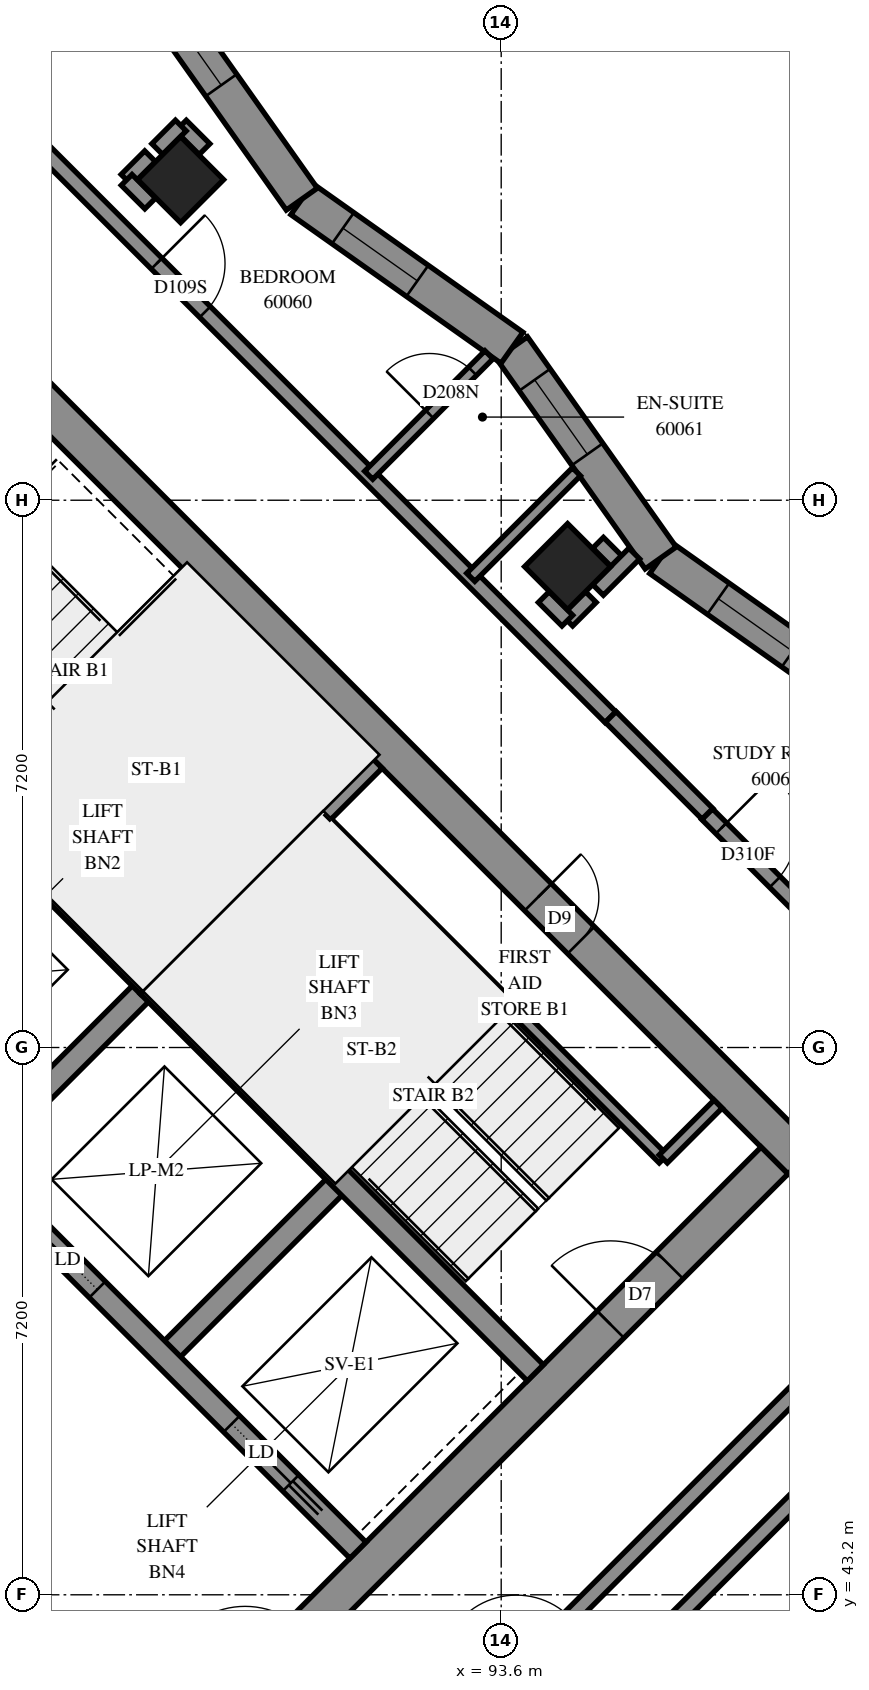
"""IFC4 building model, lengths in metres.
Left out: names, types, materials, properties, quantities, classifications, styles, units other than length and angle.
Written with IfcOpenShell. Run it as: python <this file> out.ifc"""

import sys

from ifc_helpers import new_model, si_unit, direction, frame, frame_2d, origin, origin_2d, place, context, subcontext, project, spatial, polyline, rectangle, outline, extrude, element, fill, save


model = new_model("IFC4")
c1 = context("Model", 3, precision=1e-05, world=origin(), true_north=direction((0.0, 1.0)))
c2 = subcontext(c1, "Body", "Model", "MODEL_VIEW")
j1 = project(units=[si_unit("LENGTHUNIT", "METRE"), si_unit("PLANEANGLEUNIT", "RADIAN")], contexts=[c1])
p1 = place(None, origin())
s1 = spatial("IfcSite", under=j1, at=p1, CompositionType="ELEMENT")
p2 = place(p1, origin())
s2 = spatial("IfcBuilding", under=s1, at=p2, CompositionType="ELEMENT")
p3 = place(p2, frame((0.0, 0.0, 220.2)))
s3 = spatial("IfcBuildingStorey", under=s2, at=p3, CompositionType="ELEMENT", Elevation=220.2)
for number, where, z_axis, x_axis in (
    (1, (89.382, 61.818, 0.0), (0.0, 0.0, 1.0), (0.707, -0.707, 0.0)),
    (2, (94.474, 56.727, 0.0), (0.0, 0.0, 1.0), (0.707, -0.707, 0.0)),
):
    element("IfcColumn", number, at=place(p3, frame(where, z_axis=z_axis, x_axis=x_axis)), inside=s3, PredefinedType="COLUMN", context=c2, shape_type="SweptSolid", body=[
        extrude(rectangle(XDim=0.8, YDim=0.8, at=origin_2d()), origin(), (0.0, 0.0, 1.0), 3.1),
    ])
p4 = place(p3, frame((86.66, 59.802, -0.3), z_axis=(0.0, 0.0, 1.0), x_axis=(0.7071067812, -0.7071067812, 0.0)))
e3 = element("IfcWall", 3, at=p4, inside=s3, PredefinedType="SHEAR", context=c2, shape_type="SweptSolid", body=[
    extrude(rectangle(XDim=15.4, YDim=0.5, at=frame_2d((7.7, 0.0))), origin(), (0.0, 0.0, 1.0), 2.7),
])
p5 = place(p4, frame((10.5, 0.0, 0.3)))
e4 = element("IfcOpeningElement", 4, at=p5, cuts=e3, PredefinedType="OPENING", context=c2, shape_type="SweptSolid", body=[
    extrude(rectangle(XDim=0.8, YDim=2.1, at=frame_2d((0.4, 1.05))), frame((0.0, 0.26, 0.0), z_axis=(0.0, -1.0, 0.0), x_axis=(1.0, 0.0, 0.0)), (0.0, 0.0, 1.0), 0.52),
])
p6 = place(p3, frame((87.013, 38.731, -0.3), z_axis=(0.0, 0.0, 1.0), x_axis=(0.7071067812, 0.7071067812, 0.0)))
e5 = element("IfcWall", 5, at=p6, inside=s3, PredefinedType="SHEAR", context=c2, shape_type="SweptSolid", body=[
    extrude(rectangle(XDim=14.4, YDim=0.5, at=frame_2d((7.2, 0.0))), origin(), (0.0, 0.0, 1.0), 2.7),
])
p7 = place(p6, frame((4.55, 0.0, 0.3)))
e6 = element("IfcOpeningElement", 6, at=p7, cuts=e5, PredefinedType="OPENING", context=c2, shape_type="SweptSolid", body=[
    extrude(rectangle(XDim=1.1, YDim=2.1, at=frame_2d((0.55, 1.05))), frame((0.0, 0.26, 0.0), z_axis=(0.0, -1.0, 0.0), x_axis=(1.0, 0.0, 0.0)), (0.0, 0.0, 1.0), 0.52),
])
p8 = place(p6, frame((11.35, 0.0, 0.3)))
e7 = element("IfcOpeningElement", 7, at=p8, cuts=e5, PredefinedType="OPENING", context=c2, shape_type="SweptSolid", body=[
    extrude(rectangle(XDim=1.1, YDim=2.1, at=frame_2d((0.55, 1.05))), frame((0.0, 0.26, 0.0), z_axis=(0.0, -1.0, 0.0), x_axis=(1.0, 0.0, 0.0)), (0.0, 0.0, 1.0), 0.52),
])
for number, where, z_axis, x_axis in (
    (8, (86.625, 48.878, 0.0), (0.0, 0.0, 1.0), (0.707, 0.707, 0.0)),
    (9, (89.17, 46.332, 0.0), (0.0, 0.0, 1.0), (0.707, 0.707, 0.0)),
):
    element("IfcWall", number, at=place(p3, frame(where, z_axis=z_axis, x_axis=x_axis)), inside=s3, PredefinedType="SOLIDWALL", context=c2, shape_type="SweptSolid", body=[
        extrude(rectangle(XDim=3.3, YDim=0.3, at=frame_2d((1.65, 0.0))), origin(), (0.0, 0.0, 1.0), 3.1),
    ])
p9 = place(p3, frame((78.988, 51.423, 0.0), z_axis=(0.0, 0.0, 1.0), x_axis=(0.7071067812, -0.7071067812, 0.0)))
e10 = element("IfcWall", 10, at=p9, inside=s3, PredefinedType="SOLIDWALL", context=c2, shape_type="SweptSolid", body=[
    extrude(rectangle(XDim=14.4, YDim=0.3, at=frame_2d((7.2, 0.0))), origin(), (0.0, 0.0, 1.0), 3.1),
])
p10 = place(p9, frame((1.35, 0.0, 0.0)))
e11 = element("IfcOpeningElement", 11, at=p10, cuts=e10, PredefinedType="OPENING", context=c2, shape_type="SweptSolid", body=[
    extrude(rectangle(XDim=0.9, YDim=2.1, at=frame_2d((0.45, 1.05))), frame((0.0, 0.16, 0.0), z_axis=(0.0, -1.0, 0.0), x_axis=(1.0, 0.0, 0.0)), (0.0, 0.0, 1.0), 0.32),
])
p11 = place(p9, frame((4.95, 0.0, 0.0)))
e12 = element("IfcOpeningElement", 12, at=p11, cuts=e10, PredefinedType="OPENING", context=c2, shape_type="SweptSolid", body=[
    extrude(rectangle(XDim=0.9, YDim=2.1, at=frame_2d((0.45, 1.05))), frame((0.0, 0.16, 0.0), z_axis=(0.0, -1.0, 0.0), x_axis=(1.0, 0.0, 0.0)), (0.0, 0.0, 1.0), 0.32),
])
p12 = place(p9, frame((8.55, 0.0, 0.0)))
e13 = element("IfcOpeningElement", 13, at=p12, cuts=e10, PredefinedType="OPENING", context=c2, shape_type="SweptSolid", body=[
    extrude(rectangle(XDim=0.9, YDim=2.1, at=frame_2d((0.45, 1.05))), frame((0.0, 0.16, 0.0), z_axis=(0.0, -1.0, 0.0), x_axis=(1.0, 0.0, 0.0)), (0.0, 0.0, 1.0), 0.32),
])
p13 = place(p9, frame((12.05, 0.0, 0.0)))
e14 = element("IfcOpeningElement", 14, at=p13, cuts=e10, PredefinedType="OPENING", context=c2, shape_type="SweptSolid", body=[
    extrude(rectangle(XDim=1.1, YDim=2.1, at=frame_2d((0.55, 1.05))), frame((0.0, 0.16, 0.0), z_axis=(0.0, -1.0, 0.0), x_axis=(1.0, 0.0, 0.0)), (0.0, 0.0, 1.0), 0.32),
])
p14 = place(p3, frame((81.534, 53.969, 0.0), z_axis=(0.0, 0.0, 1.0), x_axis=(0.707103309, -0.7071102534, 0.0)))
e15 = element("IfcWall", 15, at=p14, inside=s3, PredefinedType="SOLIDWALL", context=c2, shape_type="SweptSolid", body=[
    extrude(rectangle(XDim=14.4, YDim=0.3, at=frame_2d((7.2, 0.0))), origin(), (0.0, 0.0, 1.0), 3.1),
])
p15 = place(p14, frame((1.25, 0.0, 0.0)))
e16 = element("IfcOpeningElement", 16, at=p15, cuts=e15, PredefinedType="OPENING", context=c2, shape_type="SweptSolid", body=[
    extrude(rectangle(XDim=1.1, YDim=2.1, at=frame_2d((0.55, 1.05))), frame((0.0, 0.16, 0.0), z_axis=(0.0, -1.0, 0.0), x_axis=(1.0, 0.0, 0.0)), (0.0, 0.0, 1.0), 0.32),
])
p16 = place(p14, frame((4.85, 0.0, 0.0)))
e17 = element("IfcOpeningElement", 17, at=p16, cuts=e15, PredefinedType="OPENING", context=c2, shape_type="SweptSolid", body=[
    extrude(rectangle(XDim=1.1, YDim=2.1, at=frame_2d((0.55, 1.05))), frame((0.0, 0.16, 0.0), z_axis=(0.0, -1.0, 0.0), x_axis=(1.0, 0.0, 0.0)), (0.0, 0.0, 1.0), 0.32),
])
p17 = place(p14, frame((8.45, 0.0, 0.0)))
e18 = element("IfcOpeningElement", 18, at=p17, cuts=e15, PredefinedType="OPENING", context=c2, shape_type="SweptSolid", body=[
    extrude(rectangle(XDim=1.1, YDim=2.1, at=frame_2d((0.55, 1.05))), frame((0.0, 0.16, 0.0), z_axis=(0.0, -1.0, 0.0), x_axis=(1.0, 0.0, 0.0)), (0.0, 0.0, 1.0), 0.32),
])
p18 = place(p14, frame((12.05, 0.0, 0.0)))
e19 = element("IfcOpeningElement", 19, at=p18, cuts=e15, PredefinedType="OPENING", context=c2, shape_type="SweptSolid", body=[
    extrude(rectangle(XDim=1.1, YDim=2.1, at=frame_2d((0.55, 1.05))), frame((0.0, 0.16, 0.0), z_axis=(0.0, -1.0, 0.0), x_axis=(1.0, 0.0, 0.0)), (0.0, 0.0, 1.0), 0.32),
])
for number, where, z_axis, x_axis in (
    (20, (83.867, 56.302, 0.0), (0.0, 0.0, 1.0), (0.707, -0.707, 0.0)),
    (21, (88.958, 51.211, 0.0), (0.0, 0.0, 1.0), (0.707, -0.707, 0.0)),
):
    element("IfcWall", number, at=place(p3, frame(where, z_axis=z_axis, x_axis=x_axis)), inside=s3, PredefinedType="SOLIDWALL", context=c2, shape_type="SweptSolid", body=[
        extrude(rectangle(XDim=7.2, YDim=0.3, at=frame_2d((3.6, 0.0))), origin(), (0.0, 0.0, 1.0), 3.1),
    ])
p19 = place(p3, frame((88.958, 51.211, 0.0), z_axis=(0.0, 0.0, 1.0), x_axis=(0.7071067812, 0.7071067812, 0.0)))
e22 = element("IfcWall", 22, at=p19, inside=s3, PredefinedType="SOLIDWALL", context=c2, shape_type="SweptSolid", body=[
    extrude(rectangle(XDim=4.2, YDim=0.3, at=frame_2d((2.1, 0.0))), origin(), (0.0, 0.0, 1.0), 3.1),
])
p20 = place(p3, frame((98.463, 54.884, 0.0), z_axis=(0.0, 0.0, 1.0), x_axis=(-0.8163684441, 0.5775314394, 0.0)))
e23 = element("IfcWall", 23, at=p20, inside=s3, PredefinedType="SOLIDWALL", context=c2, shape_type="SweptSolid", body=[
    extrude(outline(polyline([(-0.043, -0.25), (3.344, -0.25), (3.43, 0.25), (0.043, 0.25), (-0.043, -0.25)])), origin(), (0.0, 0.0, 1.0), 3.1),
])
p21 = place(p20, frame((1.259, 0.0, 0.45)))
e24 = element("IfcOpeningElement", 24, at=p21, cuts=e23, PredefinedType="OPENING", context=c2, shape_type="SweptSolid", body=[
    extrude(rectangle(XDim=1.2, YDim=2.5, at=frame_2d((0.6, 1.25))), frame((0.0, 0.26, 0.0), z_axis=(0.0, -1.0, 0.0), x_axis=(1.0, 0.0, 0.0)), (0.0, 0.0, 1.0), 0.52),
])
p22 = place(p3, frame((95.698, 56.84, 0.0), z_axis=(0.0, 0.0, 1.0), x_axis=(-0.5775371961, 0.8163643715, 0.0)))
e25 = element("IfcWall", 25, at=p22, inside=s3, PredefinedType="SOLIDWALL", context=c2, shape_type="SweptSolid", body=[
    extrude(outline(polyline([(0.043, -0.25), (3.43, -0.25), (3.344, 0.25), (-0.043, 0.25), (0.043, -0.25)])), origin(), (0.0, 0.0, 1.0), 3.1),
])
p23 = place(p22, frame((1.67, 0.0, 0.45)))
e26 = element("IfcOpeningElement", 26, at=p23, cuts=e25, PredefinedType="OPENING", context=c2, shape_type="SweptSolid", body=[
    extrude(rectangle(XDim=1.2, YDim=2.5, at=frame_2d((0.6, 1.25))), frame((0.0, 0.26, 0.0), z_axis=(0.0, -1.0, 0.0), x_axis=(1.0, 0.0, 0.0)), (0.0, 0.0, 1.0), 0.52),
])
p24 = place(p3, frame((93.742, 59.605, 0.0), z_axis=(0.0, 0.0, 1.0), x_axis=(-0.8163684441, 0.5775314394, 0.0)))
e27 = element("IfcWall", 27, at=p24, inside=s3, PredefinedType="SOLIDWALL", context=c2, shape_type="SweptSolid", body=[
    extrude(outline(polyline([(-0.043, -0.25), (3.344, -0.25), (3.43, 0.25), (0.043, 0.25), (-0.043, -0.25)])), origin(), (0.0, 0.0, 1.0), 3.1),
])
p25 = place(p24, frame((1.525, 0.0, 0.45)))
e28 = element("IfcOpeningElement", 28, at=p25, cuts=e27, PredefinedType="OPENING", context=c2, shape_type="SweptSolid", body=[
    extrude(rectangle(XDim=1.2, YDim=2.5, at=frame_2d((0.6, 1.25))), frame((0.0, 0.26, 0.0), z_axis=(0.0, -1.0, 0.0), x_axis=(1.0, 0.0, 0.0)), (0.0, 0.0, 1.0), 0.52),
])
p26 = place(p3, frame((90.977, 61.561, 0.0), z_axis=(0.0, 0.0, 1.0), x_axis=(-0.5775371961, 0.8163643715, 0.0)))
e29 = element("IfcWall", 29, at=p26, inside=s3, PredefinedType="SOLIDWALL", context=c2, shape_type="SweptSolid", body=[
    extrude(outline(polyline([(0.043, -0.25), (3.43, -0.25), (3.344, 0.25), (-0.043, 0.25), (0.043, -0.25)])), origin(), (0.0, 0.0, 1.0), 3.1),
])
p27 = place(p26, frame((1.836, 0.0, 0.45)))
e30 = element("IfcOpeningElement", 30, at=p27, cuts=e29, PredefinedType="OPENING", context=c2, shape_type="SweptSolid", body=[
    extrude(rectangle(XDim=1.2, YDim=2.5, at=frame_2d((0.6, 1.25))), frame((0.0, 0.26, 0.0), z_axis=(0.0, -1.0, 0.0), x_axis=(1.0, 0.0, 0.0)), (0.0, 0.0, 1.0), 0.52),
])
p28 = place(p3, frame((91.313, 53.354, 0.0), z_axis=(0.0, 0.0, 1.0), x_axis=(0.7071147811, -0.7070987812, 0.0)))
e31 = element("IfcWall", 31, at=p28, inside=s3, PredefinedType="PARTITIONING", context=c2, shape_type="SweptSolid", body=[
    extrude(rectangle(XDim=6.25, YDim=0.15, at=frame_2d((3.125, 0.0))), origin(), (0.0, 0.0, 1.0), 3.1),
])
p29 = place(p3, frame((95.732, 48.934, 0.0), z_axis=(0.0, 0.0, 1.0), x_axis=(0.7071067812, 0.7071067812, 0.0)))
e32 = element("IfcWall", 32, at=p29, inside=s3, PredefinedType="PARTITIONING", context=c2, shape_type="SweptSolid", body=[
    extrude(rectangle(XDim=1.02, YDim=0.15, at=frame_2d((0.51, 0.0))), origin(), (0.0, 0.0, 1.0), 3.1),
])
p30 = place(p3, frame((86.835, 62.945, 0.0), z_axis=(0.0, 0.0, 1.0), x_axis=(0.7072533434, -0.7069601886, 0.0)))
e33 = element("IfcWall", 33, at=p30, inside=s3, PredefinedType="PARTITIONING", context=c2, shape_type="SweptSolid", body=[
    extrude(rectangle(XDim=11.598, YDim=0.2, at=frame_2d((5.799, 0.0))), origin(), (0.0, 0.0, 1.0), 3.1),
])
p31 = place(p30, frame((3.156, 0.0, 0.0)))
e34 = element("IfcOpeningElement", 34, at=p31, cuts=e33, PredefinedType="OPENING", context=c2, shape_type="SweptSolid", body=[
    extrude(rectangle(XDim=0.9, YDim=2.1, at=frame_2d((0.45, 1.05))), frame((0.0, 0.11, 0.0), z_axis=(0.0, -1.0, 0.0), x_axis=(1.0, 0.0, 0.0)), (0.0, 0.0, 1.0), 0.22),
])
p32 = place(p3, frame((93.625, 42.021, 0.0), z_axis=(0.0, 0.0, 1.0), x_axis=(0.7071067812, 0.7071067812, 0.0)))
e35 = element("IfcWall", 35, at=p32, inside=s3, PredefinedType="PARTITIONING", context=c2, shape_type="SweptSolid", body=[
    extrude(rectangle(XDim=9.998, YDim=0.2, at=frame_2d((4.999, 0.0))), origin(), (0.0, 0.0, 1.0), 3.1),
])
p33 = place(p32, frame((0.248, 0.0, 0.0)))
e36 = element("IfcOpeningElement", 36, at=p33, cuts=e35, PredefinedType="OPENING", context=c2, shape_type="SweptSolid", body=[
    extrude(rectangle(XDim=1.0, YDim=2.1, at=frame_2d((0.5, 1.05))), frame((0.0, 0.11, 0.0), z_axis=(0.0, -1.0, 0.0), x_axis=(1.0, 0.0, 0.0)), (0.0, 0.0, 1.0), 0.22),
])
p34 = place(p3, frame((94.331, 41.313, 0.0), z_axis=(0.0, 0.0, 1.0), x_axis=(0.7072516979, 0.7069618347, 0.0)))
e37 = element("IfcWall", 37, at=p34, inside=s3, PredefinedType="PARTITIONING", context=c2, shape_type="SweptSolid", body=[
    extrude(rectangle(XDim=6.9, YDim=0.2, at=frame_2d((3.45, 0.0))), origin(), (0.0, 0.0, 1.0), 3.1),
])
p35 = place(p3, frame((96.309, 53.471, 0.0), z_axis=(0.0, 0.0, 1.0), x_axis=(0.7071067812, -0.7071067812, 0.0)))
e38 = element("IfcWall", 38, at=p35, inside=s3, PredefinedType="PARTITIONING", context=c2, shape_type="SweptSolid", body=[
    extrude(rectangle(XDim=6.2, YDim=0.2, at=frame_2d((3.1, 0.0))), origin(), (0.0, 0.0, 1.0), 3.1),
])
p36 = place(p35, frame((0.263, 0.0, 0.0)))
e39 = element("IfcOpeningElement", 39, at=p36, cuts=e38, PredefinedType="OPENING", context=c2, shape_type="SweptSolid", body=[
    extrude(rectangle(XDim=1.0, YDim=2.1, at=frame_2d((0.5, 1.05))), frame((0.0, 0.11, 0.0), z_axis=(0.0, -1.0, 0.0), x_axis=(1.0, 0.0, 0.0)), (0.0, 0.0, 1.0), 0.22),
])
p37 = place(p3, frame((91.857, 57.929, 0.0), z_axis=(0.0, 0.0, 1.0), x_axis=(0.7066823676, 0.7075309402, 0.0)))
e40 = element("IfcWall", 40, at=p37, inside=s3, PredefinedType="PARTITIONING", context=c2, shape_type="SweptSolid", body=[
    extrude(rectangle(XDim=2.239, YDim=0.15, at=frame_2d((1.12, 0.0))), origin(), (0.0, 0.0, 1.0), 3.1),
])
p38 = place(p37, frame((1.133, 0.0, 0.0)))
e41 = element("IfcOpeningElement", 41, at=p38, cuts=e40, PredefinedType="OPENING", context=c2, shape_type="SweptSolid", body=[
    extrude(rectangle(XDim=0.8, YDim=2.1, at=frame_2d((0.4, 1.05))), frame((0.0, 0.085, 0.0), z_axis=(0.0, -1.0, 0.0), x_axis=(1.0, 0.0, 0.0)), (0.0, 0.0, 1.0), 0.17),
])
p39 = place(p3, frame((93.2, 56.586, 0.0), z_axis=(0.0, 0.0, 1.0), x_axis=(0.7076411282, 0.7065720301, 0.0)))
e42 = element("IfcWall", 42, at=p39, inside=s3, PredefinedType="PARTITIONING", context=c2, shape_type="SweptSolid", body=[
    extrude(rectangle(XDim=1.964, YDim=0.15, at=frame_2d((0.982, 0.0))), origin(), (0.0, 0.0, 1.0), 3.1),
])
p40 = place(p3, frame((95.041, 54.749, 0.0), z_axis=(0.0, 0.0, 1.0), x_axis=(0.7065510983, -0.7076620277, 0.0)))
e43 = element("IfcWall", 43, at=p40, inside=s3, PredefinedType="PARTITIONING", context=c2, shape_type="SweptSolid", body=[
    extrude(rectangle(XDim=1.8, YDim=0.2, at=frame_2d((0.9, 0.0))), origin(), (0.0, 0.0, 1.0), 3.1),
])
for number, where, z_axis, x_axis in (
    (44, (88.671, 61.815, 0.0), (0.0, 0.0, 1.0), (0.707, 0.707, 0.0)),
    (45, (94.469, 56.017, 0.0), (0.0, 0.0, 1.0), (0.707, 0.707, 0.0)),
    (46, (88.672, 61.814, 0.0), (0.0, 0.0, 1.0), (0.707, -0.707, 0.0)),
    (47, (89.386, 62.528, 0.0), (0.0, 0.0, 1.0), (0.707, -0.707, 0.0)),
):
    element("IfcWall", number, at=place(p3, frame(where, z_axis=z_axis, x_axis=x_axis)), inside=s3, PredefinedType="PARTITIONING", context=c2, shape_type="SweptSolid", body=[
        extrude(rectangle(XDim=0.438, YDim=0.2, at=frame_2d((0.219, 0.0))), origin(), (0.0, 0.0, 1.0), 3.1),
    ])
p41 = place(p3, frame((94.874, 57.04, 0.0), z_axis=(0.0, 0.0, 1.0), x_axis=(0.7071067812, -0.7071067812, 0.0)))
e48 = element("IfcWall", 48, at=p41, inside=s3, PredefinedType="PARTITIONING", context=c2, shape_type="SweptSolid", body=[
    extrude(rectangle(XDim=0.408, YDim=0.2, at=frame_2d((0.204, 0.0))), origin(), (0.0, 0.0, 1.0), 3.1),
])
for number, where, z_axis, x_axis in (
    (49, (89.075, 62.219, 0.0), (0.0, 0.0, 1.0), (0.707, 0.707, 0.0)),
    (50, (94.16, 56.326, 0.0), (0.0, 0.0, 1.0), (0.707, -0.707, 0.0)),
):
    element("IfcWall", number, at=place(p3, frame(where, z_axis=z_axis, x_axis=x_axis)), inside=s3, PredefinedType="PARTITIONING", context=c2, shape_type="SweptSolid", body=[
        extrude(rectangle(XDim=0.438, YDim=0.2, at=frame_2d((0.219, 0.0))), origin(), (0.0, 0.0, 1.0), 3.1),
    ])
p42 = place(p3, frame((94.873, 56.421, 0.0), z_axis=(0.0, 0.0, 1.0), x_axis=(0.7071808122, 0.7070327425, 0.0)))
e51 = element("IfcWall", 51, at=p42, inside=s3, PredefinedType="PARTITIONING", context=c2, shape_type="SweptSolid", body=[
    extrude(rectangle(XDim=0.675, YDim=0.2, at=frame_2d((0.338, 0.0))), origin(), (0.0, 0.0, 1.0), 3.1),
])
p43 = place(p21, origin())
e52 = element("IfcWindow", 52, at=p43, inside=s3, PartitioningType="SINGLE_PANEL", PredefinedType="WINDOW", context=c2, shape_type="SweptSolid", body=[
    extrude(rectangle(XDim=1.2, YDim=2.5, at=frame_2d((0.6, 1.25))), frame((0.0, 0.18, 0.0), z_axis=(0.0, -1.0, 0.0), x_axis=(1.0, 0.0, 0.0)), (0.0, 0.0, 1.0), 0.06),
])
fill(e24, e52)
p44 = place(p23, origin())
e53 = element("IfcWindow", 53, at=p44, inside=s3, PartitioningType="SINGLE_PANEL", PredefinedType="WINDOW", context=c2, shape_type="SweptSolid", body=[
    extrude(rectangle(XDim=1.2, YDim=2.5, at=frame_2d((0.6, 1.25))), frame((0.0, 0.18, 0.0), z_axis=(0.0, -1.0, 0.0), x_axis=(1.0, 0.0, 0.0)), (0.0, 0.0, 1.0), 0.06),
])
fill(e26, e53)
p45 = place(p25, origin())
e54 = element("IfcWindow", 54, at=p45, inside=s3, PartitioningType="SINGLE_PANEL", PredefinedType="WINDOW", context=c2, shape_type="SweptSolid", body=[
    extrude(rectangle(XDim=1.2, YDim=2.5, at=frame_2d((0.6, 1.25))), frame((0.0, 0.18, 0.0), z_axis=(0.0, -1.0, 0.0), x_axis=(1.0, 0.0, 0.0)), (0.0, 0.0, 1.0), 0.06),
])
fill(e28, e54)
p46 = place(p27, origin())
e55 = element("IfcWindow", 55, at=p46, inside=s3, PartitioningType="SINGLE_PANEL", PredefinedType="WINDOW", context=c2, shape_type="SweptSolid", body=[
    extrude(rectangle(XDim=1.2, YDim=2.5, at=frame_2d((0.6, 1.25))), frame((0.0, 0.18, 0.0), z_axis=(0.0, -1.0, 0.0), x_axis=(1.0, 0.0, 0.0)), (0.0, 0.0, 1.0), 0.06),
])
fill(e30, e55)
p47 = place(p5, origin())
e56 = element("IfcDoor", 56, at=p47, inside=s3, OperationType="SINGLE_SWING_RIGHT", PredefinedType="DOOR", context=c2, shape_type="SweptSolid", body=[
    extrude(rectangle(XDim=0.8, YDim=2.1, at=frame_2d((0.4, 1.05))), frame((0.0, 0.025, 0.0), z_axis=(0.0, -1.0, 0.0), x_axis=(1.0, 0.0, 0.0)), (0.0, 0.0, 1.0), 0.05),
])
fill(e4, e56)
p48 = place(p8, origin())
e57 = element("IfcDoor", 57, at=p48, inside=s3, OperationType="SINGLE_SWING_RIGHT", PredefinedType="DOOR", context=c2, shape_type="SweptSolid", body=[
    extrude(rectangle(XDim=1.1, YDim=2.1, at=frame_2d((0.55, 1.05))), frame((0.0, 0.025, 0.0), z_axis=(0.0, -1.0, 0.0), x_axis=(1.0, 0.0, 0.0)), (0.0, 0.0, 1.0), 0.05),
])
fill(e7, e57)
p49 = place(p17, origin())
e58 = element("IfcDoor", 58, at=p49, inside=s3, OperationType="SLIDING_TO_LEFT", PredefinedType="DOOR", context=c2, shape_type="SweptSolid", body=[
    extrude(rectangle(XDim=1.1, YDim=2.1, at=frame_2d((0.55, 1.05))), frame((0.0, 0.025, 0.0), z_axis=(0.0, -1.0, 0.0), x_axis=(1.0, 0.0, 0.0)), (0.0, 0.0, 1.0), 0.05),
])
fill(e18, e58)
p50 = place(p18, origin())
e59 = element("IfcDoor", 59, at=p50, inside=s3, OperationType="SLIDING_TO_RIGHT", PredefinedType="DOOR", context=c2, shape_type="SweptSolid", body=[
    extrude(rectangle(XDim=1.1, YDim=2.1, at=frame_2d((0.55, 1.05))), frame((0.0, 0.025, 0.0), z_axis=(0.0, -1.0, 0.0), x_axis=(1.0, 0.0, 0.0)), (0.0, 0.0, 1.0), 0.05),
])
fill(e19, e59)
p51 = place(p31, origin())
e60 = element("IfcDoor", 60, at=p51, inside=s3, OperationType="SINGLE_SWING_LEFT", PredefinedType="DOOR", context=c2, shape_type="SweptSolid", body=[
    extrude(rectangle(XDim=0.9, YDim=2.1, at=frame_2d((0.45, 1.05))), frame((0.0, 0.025, 0.0), z_axis=(0.0, -1.0, 0.0), x_axis=(1.0, 0.0, 0.0)), (0.0, 0.0, 1.0), 0.05),
])
fill(e34, e60)
p52 = place(p38, origin())
e61 = element("IfcDoor", 61, at=p52, inside=s3, OperationType="SINGLE_SWING_RIGHT", PredefinedType="DOOR", context=c2, shape_type="SweptSolid", body=[
    extrude(rectangle(XDim=0.8, YDim=2.1, at=frame_2d((0.4, 1.05))), frame((0.0, 0.025, 0.0), z_axis=(0.0, -1.0, 0.0), x_axis=(1.0, 0.0, 0.0)), (0.0, 0.0, 1.0), 0.05),
])
fill(e41, e61)
p53 = place(p36, origin())
e62 = element("IfcDoor", 62, at=p53, inside=s3, OperationType="SINGLE_SWING_LEFT", PredefinedType="DOOR", context=c2, shape_type="SweptSolid", body=[
    extrude(rectangle(XDim=1.0, YDim=2.1, at=frame_2d((0.5, 1.05))), frame((0.0, 0.025, 0.0), z_axis=(0.0, -1.0, 0.0), x_axis=(1.0, 0.0, 0.0)), (0.0, 0.0, 1.0), 0.05),
])
fill(e39, e62)
save(model, sys.argv[1])
